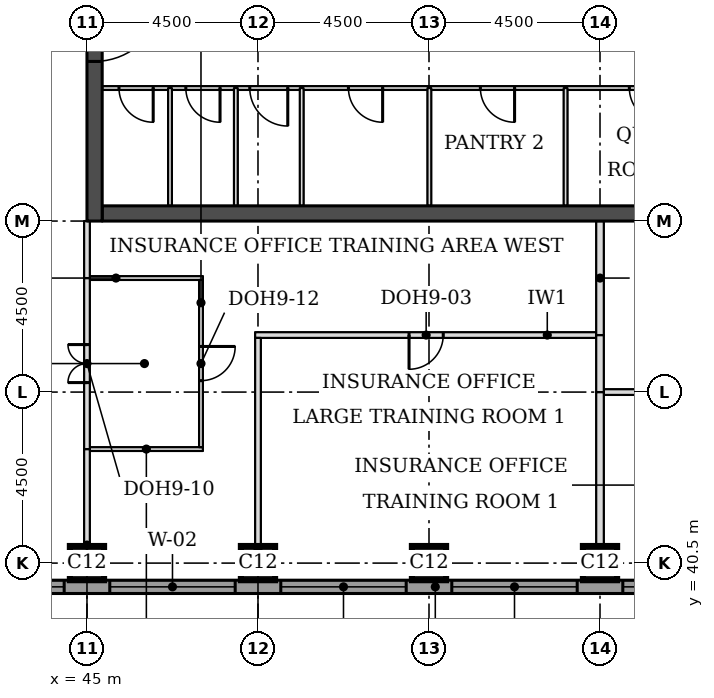
"""IFC4 building model, lengths in metres.
Left out: names, types, materials, properties, quantities, classifications, styles, units other than length and angle.
Written with IfcOpenShell. Run it as: python <this file> out.ifc"""

import sys

from ifc_helpers import new_model, si_unit, direction, frame, frame_2d, origin, origin_2d, place, context, subcontext, project, spatial, rectangle, extrude, element, fill, save


model = new_model("IFC4")
c1 = context("Model", 3, precision=1e-05, world=origin(), true_north=direction((0.0, 1.0)))
c2 = subcontext(c1, "Body", "Model", "MODEL_VIEW")
j1 = project(units=[si_unit("LENGTHUNIT", "METRE"), si_unit("PLANEANGLEUNIT", "RADIAN")], contexts=[c1])
p1 = place(None, origin())
s1 = spatial("IfcSite", under=j1, at=p1, CompositionType="ELEMENT")
p2 = place(p1, origin())
s2 = spatial("IfcBuilding", under=s1, at=p2, CompositionType="ELEMENT")
p3 = place(p2, frame((0.0, 0.0, 211.9)))
s3 = spatial("IfcBuildingStorey", under=s2, at=p3, CompositionType="ELEMENT", Elevation=211.9)
for number, where, z_axis, x_axis in (
    (1, (45.0, 40.5, 0.0), (0.0, 0.0, 1.0), (1.0, 0.0, 0.0)),
    (2, (49.5, 40.5, 0.0), (0.0, 0.0, 1.0), (1.0, 0.0, 0.0)),
    (3, (54.0, 40.5, 0.0), (0.0, 0.0, 1.0), (1.0, 0.0, 0.0)),
    (4, (58.5, 40.5, 0.0), (0.0, 0.0, 1.0), (1.0, 0.0, 0.0)),
):
    element("IfcColumn", number, at=place(p3, frame(where, z_axis=z_axis, x_axis=x_axis)), inside=s3, PredefinedType="COLUMN", context=c2, shape_type="SweptSolid", body=[
        extrude(rectangle(XDim=0.9, YDim=0.9, at=origin_2d()), origin(), (0.0, 0.0, 1.0), 3.7),
    ])
p4 = place(p3, frame((45.4, 49.7, 0.0), z_axis=(0.0, 0.0, 1.0), x_axis=(1.0, 0.0, 0.0)))
e5 = element("IfcWall", 5, at=p4, inside=s3, PredefinedType="SHEAR", context=c2, shape_type="SweptSolid", body=[
    extrude(rectangle(XDim=21.7, YDim=0.4, at=frame_2d((10.85, 0.0))), origin(), (0.0, 0.0, 1.0), 3.7),
])
p5 = place(p3, frame((45.2, 49.5, 0.0), z_axis=(0.0, 0.0, 1.0), x_axis=(0.0, 1.0, 0.0)))
e6 = element("IfcWall", 6, at=p5, inside=s3, PredefinedType="SHEAR", context=c2, shape_type="SweptSolid", body=[
    extrude(rectangle(XDim=22.5, YDim=0.4, at=frame_2d((11.25, 0.0))), origin(), (0.0, 0.0, 1.0), 3.7),
])
p6 = place(p5, frame((4.2, 0.0, 0.0)))
e7 = element("IfcOpeningElement", 7, at=p6, cuts=e6, PredefinedType="OPENING", context=c2, shape_type="SweptSolid", body=[
    extrude(rectangle(XDim=1.8, YDim=2.1, at=frame_2d((0.9, 1.05))), frame((0.0, 0.21, 0.0), z_axis=(0.0, -1.0, 0.0), x_axis=(1.0, 0.0, 0.0)), (0.0, 0.0, 1.0), 0.42),
])
p7 = place(p5, frame((6.9, 0.0, 0.0)))
e8 = element("IfcOpeningElement", 8, at=p7, cuts=e6, PredefinedType="OPENING", context=c2, shape_type="SweptSolid", body=[
    extrude(rectangle(XDim=1.1, YDim=2.1, at=frame_2d((0.55, 1.05))), frame((0.0, 0.21, 0.0), z_axis=(0.0, -1.0, 0.0), x_axis=(1.0, 0.0, 0.0)), (0.0, 0.0, 1.0), 0.42),
])
p8 = place(p5, frame((13.6, 0.0, 0.0)))
e9 = element("IfcOpeningElement", 9, at=p8, cuts=e6, PredefinedType="OPENING", context=c2, shape_type="SweptSolid", body=[
    extrude(rectangle(XDim=1.1, YDim=2.1, at=frame_2d((0.55, 1.05))), frame((0.0, 0.21, 0.0), z_axis=(0.0, -1.0, 0.0), x_axis=(1.0, 0.0, 0.0)), (0.0, 0.0, 1.0), 0.42),
])
p9 = place(p5, frame((16.5, 0.0, 0.0)))
e10 = element("IfcOpeningElement", 10, at=p9, cuts=e6, PredefinedType="OPENING", context=c2, shape_type="SweptSolid", body=[
    extrude(rectangle(XDim=1.8, YDim=2.1, at=frame_2d((0.9, 1.05))), frame((0.0, 0.21, 0.0), z_axis=(0.0, -1.0, 0.0), x_axis=(1.0, 0.0, 0.0)), (0.0, 0.0, 1.0), 0.42),
])
p10 = place(p3, frame((36.0, 39.875, 0.0), z_axis=(0.0, 0.0, 1.0), x_axis=(1.0, 0.0, 0.0)))
e11 = element("IfcWall", 11, at=p10, inside=s3, PredefinedType="STANDARD", context=c2, shape_type="SweptSolid", body=[
    extrude(rectangle(XDim=36.331, YDim=0.35, at=frame_2d((18.166, 0.0))), origin(), (0.0, 0.0, 1.0), 3.525),
])
p11 = place(p10, frame((5.1, 0.0, 0.9)))
e12 = element("IfcOpeningElement", 12, at=p11, cuts=e11, PredefinedType="OPENING", context=c2, shape_type="SweptSolid", body=[
    extrude(rectangle(XDim=3.3, YDim=1.9, at=frame_2d((1.65, 0.95))), frame((0.0, 0.185, 0.0), z_axis=(0.0, -1.0, 0.0), x_axis=(1.0, 0.0, 0.0)), (0.0, 0.0, 1.0), 0.37),
])
p12 = place(p10, frame((9.6, 0.0, 0.9)))
e13 = element("IfcOpeningElement", 13, at=p12, cuts=e11, PredefinedType="OPENING", context=c2, shape_type="SweptSolid", body=[
    extrude(rectangle(XDim=3.3, YDim=1.9, at=frame_2d((1.65, 0.95))), frame((0.0, 0.185, 0.0), z_axis=(0.0, -1.0, 0.0), x_axis=(1.0, 0.0, 0.0)), (0.0, 0.0, 1.0), 0.37),
])
p13 = place(p10, frame((14.1, 0.0, 0.9)))
e14 = element("IfcOpeningElement", 14, at=p13, cuts=e11, PredefinedType="OPENING", context=c2, shape_type="SweptSolid", body=[
    extrude(rectangle(XDim=3.3, YDim=1.9, at=frame_2d((1.65, 0.95))), frame((0.0, 0.185, 0.0), z_axis=(0.0, -1.0, 0.0), x_axis=(1.0, 0.0, 0.0)), (0.0, 0.0, 1.0), 0.37),
])
p14 = place(p10, frame((18.6, 0.0, 0.9)))
e15 = element("IfcOpeningElement", 15, at=p14, cuts=e11, PredefinedType="OPENING", context=c2, shape_type="SweptSolid", body=[
    extrude(rectangle(XDim=3.3, YDim=1.9, at=frame_2d((1.65, 0.95))), frame((0.0, 0.185, 0.0), z_axis=(0.0, -1.0, 0.0), x_axis=(1.0, 0.0, 0.0)), (0.0, 0.0, 1.0), 0.37),
])
p15 = place(p10, frame((23.1, 0.0, 0.9)))
e16 = element("IfcOpeningElement", 16, at=p15, cuts=e11, PredefinedType="OPENING", context=c2, shape_type="SweptSolid", body=[
    extrude(rectangle(XDim=3.3, YDim=1.9, at=frame_2d((1.65, 0.95))), frame((0.0, 0.185, 0.0), z_axis=(0.0, -1.0, 0.0), x_axis=(1.0, 0.0, 0.0)), (0.0, 0.0, 1.0), 0.37),
])
p16 = place(p10, frame((27.6, 0.0, 0.9)))
e17 = element("IfcOpeningElement", 17, at=p16, cuts=e11, PredefinedType="OPENING", context=c2, shape_type="SweptSolid", body=[
    extrude(rectangle(XDim=3.3, YDim=1.9, at=frame_2d((1.65, 0.95))), frame((0.0, 0.185, 0.0), z_axis=(0.0, -1.0, 0.0), x_axis=(1.0, 0.0, 0.0)), (0.0, 0.0, 1.0), 0.37),
])
p17 = place(p3, frame((45.075, 43.5, 0.0), z_axis=(0.0, 0.0, 1.0), x_axis=(1.0, 0.0, 0.0)))
e18 = element("IfcWall", 18, at=p17, inside=s3, PredefinedType="PARTITIONING", context=c2, shape_type="SweptSolid", body=[
    extrude(rectangle(XDim=2.975, YDim=0.1, at=frame_2d((1.488, 0.0))), origin(), (0.0, 0.0, 1.0), 3.55),
])
p18 = place(p3, frame((58.6, 45.0, 0.0), z_axis=(0.0, 0.0, 1.0), x_axis=(1.0, 0.0, 0.0)))
e19 = element("IfcWall", 19, at=p18, inside=s3, PredefinedType="PARTITIONING", context=c2, shape_type="SweptSolid", body=[
    extrude(rectangle(XDim=4.475, YDim=0.15, at=frame_2d((2.237, 0.0))), origin(), (0.0, 0.0, 1.0), 3.55),
])
p19 = place(p18, frame((1.8, 0.0, 0.0)))
e20 = element("IfcOpeningElement", 20, at=p19, cuts=e19, PredefinedType="OPENING", context=c2, shape_type="SweptSolid", body=[
    extrude(rectangle(XDim=0.9, YDim=2.1, at=frame_2d((0.45, 1.05))), frame((0.0, 0.085, 0.0), z_axis=(0.0, -1.0, 0.0), x_axis=(1.0, 0.0, 0.0)), (0.0, 0.0, 1.0), 0.17),
])
p20 = place(p3, frame((49.425, 46.5, 0.0), z_axis=(0.0, 0.0, 1.0), x_axis=(1.0, 0.0, 0.0)))
e21 = element("IfcWall", 21, at=p20, inside=s3, PredefinedType="PARTITIONING", context=c2, shape_type="SweptSolid", body=[
    extrude(rectangle(XDim=8.975, YDim=0.15, at=frame_2d((4.487, 0.0))), origin(), (0.0, 0.0, 1.0), 3.55),
])
p21 = place(p20, frame((4.05, 0.0, 0.0)))
e22 = element("IfcOpeningElement", 22, at=p21, cuts=e21, PredefinedType="OPENING", context=c2, shape_type="SweptSolid", body=[
    extrude(rectangle(XDim=0.9, YDim=2.1, at=frame_2d((0.45, 1.05))), frame((0.0, 0.085, 0.0), z_axis=(0.0, -1.0, 0.0), x_axis=(1.0, 0.0, 0.0)), (0.0, 0.0, 1.0), 0.17),
])
p22 = place(p3, frame((45.075, 48.0, 0.0), z_axis=(0.0, 0.0, 1.0), x_axis=(1.0, 0.0, 0.0)))
e23 = element("IfcWall", 23, at=p22, inside=s3, PredefinedType="PARTITIONING", context=c2, shape_type="SweptSolid", body=[
    extrude(rectangle(XDim=2.975, YDim=0.1, at=frame_2d((1.488, 0.0))), origin(), (0.0, 0.0, 1.0), 3.55),
])
p23 = place(p3, frame((45.0, 40.05, 0.0), z_axis=(0.0, 0.0, 1.0), x_axis=(0.0, 1.0, 0.0)))
e24 = element("IfcWall", 24, at=p23, inside=s3, PredefinedType="PARTITIONING", context=c2, shape_type="SweptSolid", body=[
    extrude(rectangle(XDim=3.45, YDim=0.15, at=frame_2d((1.725, 0.0))), origin(), (0.0, 0.0, 1.0), 3.022),
])
p24 = place(p3, frame((49.5, 40.05, 0.0), z_axis=(0.0, 0.0, 1.0), x_axis=(0.0, 1.0, 0.0)))
e25 = element("IfcWall", 25, at=p24, inside=s3, PredefinedType="PARTITIONING", context=c2, shape_type="SweptSolid", body=[
    extrude(rectangle(XDim=6.375, YDim=0.15, at=frame_2d((3.188, 0.0))), origin(), (0.0, 0.0, 1.0), 3.55),
])
p25 = place(p3, frame((58.5, 40.05, 0.0), z_axis=(0.0, 0.0, 1.0), x_axis=(0.0, 1.0, 0.0)))
e26 = element("IfcWall", 26, at=p25, inside=s3, PredefinedType="PARTITIONING", context=c2, shape_type="SweptSolid", body=[
    extrude(rectangle(XDim=4.95, YDim=0.2, at=frame_2d((2.475, 0.0))), origin(), (0.0, 0.0, 1.0), 3.55),
])
p26 = place(p3, frame((45.0, 43.5, 0.0), z_axis=(0.0, 0.0, 1.0), x_axis=(0.0, 1.0, 0.0)))
e27 = element("IfcWall", 27, at=p26, inside=s3, PredefinedType="PARTITIONING", context=c2, shape_type="SweptSolid", body=[
    extrude(rectangle(XDim=4.5, YDim=0.15, at=frame_2d((2.25, 0.0))), origin(), (0.0, 0.0, 1.0), 3.022),
])
p27 = place(p26, frame((1.75, 0.0, 0.0)))
e28 = element("IfcOpeningElement", 28, at=p27, cuts=e27, PredefinedType="OPENING", context=c2, shape_type="SweptSolid", body=[
    extrude(rectangle(XDim=1.0, YDim=2.1, at=frame_2d((0.5, 1.05))), frame((0.0, 0.085, 0.0), z_axis=(0.0, -1.0, 0.0), x_axis=(1.0, 0.0, 0.0)), (0.0, 0.0, 1.0), 0.17),
])
p28 = place(p3, frame((48.0, 43.55, 0.0), z_axis=(0.0, 0.0, 1.0), x_axis=(0.0, 1.0, 0.0)))
e29 = element("IfcWall", 29, at=p28, inside=s3, PredefinedType="PARTITIONING", context=c2, shape_type="SweptSolid", body=[
    extrude(rectangle(XDim=4.4, YDim=0.1, at=frame_2d((2.2, 0.0))), origin(), (0.0, 0.0, 1.0), 3.55),
])
p29 = place(p28, frame((1.75, 0.0, 0.0)))
e30 = element("IfcOpeningElement", 30, at=p29, cuts=e29, PredefinedType="OPENING", context=c2, shape_type="SweptSolid", body=[
    extrude(rectangle(XDim=0.9, YDim=2.1, at=frame_2d((0.45, 1.05))), frame((0.0, 0.06, 0.0), z_axis=(0.0, -1.0, 0.0), x_axis=(1.0, 0.0, 0.0)), (0.0, 0.0, 1.0), 0.12),
])
p30 = place(p3, frame((58.5, 45.0, 0.0), z_axis=(0.0, 0.0, 1.0), x_axis=(0.0, 1.0, 0.0)))
e31 = element("IfcWall", 31, at=p30, inside=s3, PredefinedType="PARTITIONING", context=c2, shape_type="SweptSolid", body=[
    extrude(rectangle(XDim=1.5, YDim=0.2, at=frame_2d((0.75, 0.0))), origin(), (0.0, 0.0, 1.0), 3.55),
])
p31 = place(p3, frame((58.5, 46.5, 0.0), z_axis=(0.0, 0.0, 1.0), x_axis=(0.0, 1.0, 0.0)))
e32 = element("IfcWall", 32, at=p31, inside=s3, PredefinedType="PARTITIONING", context=c2, shape_type="SweptSolid", body=[
    extrude(rectangle(XDim=3.0, YDim=0.2, at=frame_2d((1.5, 0.0))), origin(), (0.0, 0.0, 1.0), 3.55),
])
p32 = place(p3, frame((45.0, 48.0, 0.0), z_axis=(0.0, 0.0, 1.0), x_axis=(0.0, 1.0, 0.0)))
e33 = element("IfcWall", 33, at=p32, inside=s3, PredefinedType="PARTITIONING", context=c2, shape_type="SweptSolid", body=[
    extrude(rectangle(XDim=1.5, YDim=0.15, at=frame_2d((0.75, 0.0))), origin(), (0.0, 0.0, 1.0), 3.022),
])
p33 = place(p3, frame((45.4, 53.0, 0.0), z_axis=(0.0, 0.0, 1.0), x_axis=(1.0, 0.0, 0.0)))
e34 = element("IfcWall", 34, at=p33, inside=s3, PredefinedType="PARTITIONING", context=c2, shape_type="SweptSolid", body=[
    extrude(rectangle(XDim=21.7, YDim=0.1, at=frame_2d((10.85, 0.0))), origin(), (0.0, 0.0, 1.0), 3.55),
])
p34 = place(p33, frame((20.305, 0.0, 0.0)))
e35 = element("IfcOpeningElement", 35, at=p34, cuts=e34, PredefinedType="OPENING", context=c2, shape_type="SweptSolid", body=[
    extrude(rectangle(XDim=0.9, YDim=2.1, at=frame_2d((0.45, 1.05))), frame((0.0, 0.06, 0.0), z_axis=(0.0, -1.0, 0.0), x_axis=(1.0, 0.0, 0.0)), (0.0, 0.0, 1.0), 0.12),
])
p35 = place(p33, frame((17.68, 0.0, 0.0)))
e36 = element("IfcOpeningElement", 36, at=p35, cuts=e34, PredefinedType="OPENING", context=c2, shape_type="SweptSolid", body=[
    extrude(rectangle(XDim=0.9, YDim=2.1, at=frame_2d((0.45, 1.05))), frame((0.0, 0.06, 0.0), z_axis=(0.0, -1.0, 0.0), x_axis=(1.0, 0.0, 0.0)), (0.0, 0.0, 1.0), 0.12),
])
p36 = place(p33, frame((0.442, 0.0, 0.0)))
e37 = element("IfcOpeningElement", 37, at=p36, cuts=e34, PredefinedType="OPENING", context=c2, shape_type="SweptSolid", body=[
    extrude(rectangle(XDim=0.9, YDim=2.1, at=frame_2d((0.45, 1.05))), frame((0.0, 0.06, 0.0), z_axis=(0.0, -1.0, 0.0), x_axis=(1.0, 0.0, 0.0)), (0.0, 0.0, 1.0), 0.12),
])
p37 = place(p33, frame((2.201, 0.0, 0.0)))
e38 = element("IfcOpeningElement", 38, at=p37, cuts=e34, PredefinedType="OPENING", context=c2, shape_type="SweptSolid", body=[
    extrude(rectangle(XDim=0.9, YDim=2.1, at=frame_2d((0.45, 1.05))), frame((0.0, 0.06, 0.0), z_axis=(0.0, -1.0, 0.0), x_axis=(1.0, 0.0, 0.0)), (0.0, 0.0, 1.0), 0.12),
])
p38 = place(p33, frame((3.884, 0.0, 0.0)))
e39 = element("IfcOpeningElement", 39, at=p38, cuts=e34, PredefinedType="OPENING", context=c2, shape_type="SweptSolid", body=[
    extrude(rectangle(XDim=1.0, YDim=2.1, at=frame_2d((0.5, 1.05))), frame((0.0, 0.06, 0.0), z_axis=(0.0, -1.0, 0.0), x_axis=(1.0, 0.0, 0.0)), (0.0, 0.0, 1.0), 0.12),
])
p39 = place(p33, frame((6.48, 0.0, 0.0)))
e40 = element("IfcOpeningElement", 40, at=p39, cuts=e34, PredefinedType="OPENING", context=c2, shape_type="SweptSolid", body=[
    extrude(rectangle(XDim=0.9, YDim=2.1, at=frame_2d((0.45, 1.05))), frame((0.0, 0.06, 0.0), z_axis=(0.0, -1.0, 0.0), x_axis=(1.0, 0.0, 0.0)), (0.0, 0.0, 1.0), 0.12),
])
p40 = place(p33, frame((9.952, 0.0, 0.0)))
e41 = element("IfcOpeningElement", 41, at=p40, cuts=e34, PredefinedType="OPENING", context=c2, shape_type="SweptSolid", body=[
    extrude(rectangle(XDim=0.9, YDim=2.1, at=frame_2d((0.45, 1.05))), frame((0.0, 0.06, 0.0), z_axis=(0.0, -1.0, 0.0), x_axis=(1.0, 0.0, 0.0)), (0.0, 0.0, 1.0), 0.12),
])
p41 = place(p33, frame((13.872, 0.0, 0.0)))
e42 = element("IfcOpeningElement", 42, at=p41, cuts=e34, PredefinedType="OPENING", context=c2, shape_type="SweptSolid", body=[
    extrude(rectangle(XDim=0.9, YDim=2.1, at=frame_2d((0.45, 1.05))), frame((0.0, 0.06, 0.0), z_axis=(0.0, -1.0, 0.0), x_axis=(1.0, 0.0, 0.0)), (0.0, 0.0, 1.0), 0.12),
])
for number, where, z_axis, x_axis in (
    (43, (47.185, 49.9, 0.0), (0.0, 0.0, 1.0), (0.0, 1.0, 0.0)),
    (44, (48.917, 49.9, 0.0), (0.0, 0.0, 1.0), (0.0, 1.0, 0.0)),
    (45, (50.65, 49.9, 0.0), (0.0, 0.0, 1.0), (0.0, 1.0, 0.0)),
    (46, (54.01, 49.9, 0.0), (0.0, 0.0, 1.0), (0.0, 1.0, 0.0)),
    (47, (57.594, 49.9, 0.0), (0.0, 0.0, 1.0), (0.0, 1.0, 0.0)),
):
    element("IfcWall", number, at=place(p3, frame(where, z_axis=z_axis, x_axis=x_axis)), inside=s3, PredefinedType="PARTITIONING", context=c2, shape_type="SweptSolid", body=[
        extrude(rectangle(XDim=3.1, YDim=0.1, at=frame_2d((1.55, 0.0))), origin(), (0.0, 0.0, 1.0), 3.55),
    ])
p42 = place(p11, origin())
e48 = element("IfcWindow", 48, at=p42, inside=s3, PartitioningType="SINGLE_PANEL", PredefinedType="WINDOW", context=c2, shape_type="SweptSolid", body=[
    extrude(rectangle(XDim=3.3, YDim=1.9, at=frame_2d((1.65, 0.95))), frame((0.0, 0.085, 0.0), z_axis=(0.0, -1.0, 0.0), x_axis=(1.0, 0.0, 0.0)), (0.0, 0.0, 1.0), 0.06),
])
fill(e12, e48)
p43 = place(p12, origin())
e49 = element("IfcWindow", 49, at=p43, inside=s3, PartitioningType="SINGLE_PANEL", PredefinedType="WINDOW", context=c2, shape_type="SweptSolid", body=[
    extrude(rectangle(XDim=3.3, YDim=1.9, at=frame_2d((1.65, 0.95))), frame((0.0, 0.085, 0.0), z_axis=(0.0, -1.0, 0.0), x_axis=(1.0, 0.0, 0.0)), (0.0, 0.0, 1.0), 0.06),
])
fill(e13, e49)
p44 = place(p13, origin())
e50 = element("IfcWindow", 50, at=p44, inside=s3, PartitioningType="SINGLE_PANEL", PredefinedType="WINDOW", context=c2, shape_type="SweptSolid", body=[
    extrude(rectangle(XDim=3.3, YDim=1.9, at=frame_2d((1.65, 0.95))), frame((0.0, 0.085, 0.0), z_axis=(0.0, -1.0, 0.0), x_axis=(1.0, 0.0, 0.0)), (0.0, 0.0, 1.0), 0.06),
])
fill(e14, e50)
p45 = place(p14, origin())
e51 = element("IfcWindow", 51, at=p45, inside=s3, PartitioningType="SINGLE_PANEL", PredefinedType="WINDOW", context=c2, shape_type="SweptSolid", body=[
    extrude(rectangle(XDim=3.3, YDim=1.9, at=frame_2d((1.65, 0.95))), frame((0.0, 0.085, 0.0), z_axis=(0.0, -1.0, 0.0), x_axis=(1.0, 0.0, 0.0)), (0.0, 0.0, 1.0), 0.06),
])
fill(e15, e51)
p46 = place(p15, origin())
e52 = element("IfcWindow", 52, at=p46, inside=s3, PartitioningType="SINGLE_PANEL", PredefinedType="WINDOW", context=c2, shape_type="SweptSolid", body=[
    extrude(rectangle(XDim=3.3, YDim=1.9, at=frame_2d((1.65, 0.95))), frame((0.0, 0.085, 0.0), z_axis=(0.0, -1.0, 0.0), x_axis=(1.0, 0.0, 0.0)), (0.0, 0.0, 1.0), 0.06),
])
fill(e16, e52)
p47 = place(p27, origin())
e53 = element("IfcDoor", 53, at=p47, inside=s3, OperationType="DOUBLE_DOOR_SINGLE_SWING", PredefinedType="DOOR", context=c2, shape_type="SweptSolid", body=[
    extrude(rectangle(XDim=1.0, YDim=2.1, at=frame_2d((0.5, 1.05))), frame((0.0, 0.025, 0.0), z_axis=(0.0, -1.0, 0.0), x_axis=(1.0, 0.0, 0.0)), (0.0, 0.0, 1.0), 0.05),
])
fill(e28, e53)
p48 = place(p29, frame((0.9, 0.0, 0.0), z_axis=(0.0, 0.0, 1.0), x_axis=(-1.0, 0.0, 0.0)))
e54 = element("IfcDoor", 54, at=p48, inside=s3, OperationType="SINGLE_SWING_LEFT", PredefinedType="DOOR", context=c2, shape_type="SweptSolid", body=[
    extrude(rectangle(XDim=0.9, YDim=2.1, at=frame_2d((0.45, 1.05))), frame((0.0, 0.025, 0.0), z_axis=(0.0, -1.0, 0.0), x_axis=(1.0, 0.0, 0.0)), (0.0, 0.0, 1.0), 0.05),
])
fill(e30, e54)
p49 = place(p21, frame((0.9, 0.0, 0.0), z_axis=(0.0, 0.0, 1.0), x_axis=(-1.0, 0.0, 0.0)))
e55 = element("IfcDoor", 55, at=p49, inside=s3, OperationType="SINGLE_SWING_RIGHT", PredefinedType="DOOR", context=c2, shape_type="SweptSolid", body=[
    extrude(rectangle(XDim=0.9, YDim=2.1, at=frame_2d((0.45, 1.05))), frame((0.0, 0.025, 0.0), z_axis=(0.0, -1.0, 0.0), x_axis=(1.0, 0.0, 0.0)), (0.0, 0.0, 1.0), 0.05),
])
fill(e22, e55)
p50 = place(p6, frame((1.8, 0.0, 0.0), z_axis=(0.0, 0.0, 1.0), x_axis=(-1.0, 0.0, 0.0)))
e56 = element("IfcDoor", 56, at=p50, inside=s3, OperationType="SINGLE_SWING_LEFT", PredefinedType="DOOR", context=c2, shape_type="SweptSolid", body=[
    extrude(rectangle(XDim=1.8, YDim=2.1, at=frame_2d((0.9, 1.05))), frame((0.0, 0.025, 0.0), z_axis=(0.0, -1.0, 0.0), x_axis=(1.0, 0.0, 0.0)), (0.0, 0.0, 1.0), 0.05),
])
fill(e7, e56)
p51 = place(p36, frame((0.9, 0.0, 0.0), z_axis=(0.0, 0.0, 1.0), x_axis=(-1.0, 0.0, 0.0)))
e57 = element("IfcDoor", 57, at=p51, inside=s3, OperationType="SINGLE_SWING_LEFT", PredefinedType="DOOR", context=c2, shape_type="SweptSolid", body=[
    extrude(rectangle(XDim=0.9, YDim=2.1, at=frame_2d((0.45, 1.05))), frame((0.0, 0.025, 0.0), z_axis=(0.0, -1.0, 0.0), x_axis=(1.0, 0.0, 0.0)), (0.0, 0.0, 1.0), 0.05),
])
fill(e37, e57)
p52 = place(p37, frame((0.9, 0.0, 0.0), z_axis=(0.0, 0.0, 1.0), x_axis=(-1.0, 0.0, 0.0)))
e58 = element("IfcDoor", 58, at=p52, inside=s3, OperationType="SINGLE_SWING_LEFT", PredefinedType="DOOR", context=c2, shape_type="SweptSolid", body=[
    extrude(rectangle(XDim=0.9, YDim=2.1, at=frame_2d((0.45, 1.05))), frame((0.0, 0.025, 0.0), z_axis=(0.0, -1.0, 0.0), x_axis=(1.0, 0.0, 0.0)), (0.0, 0.0, 1.0), 0.05),
])
fill(e38, e58)
p53 = place(p38, frame((1.0, 0.0, 0.0), z_axis=(0.0, 0.0, 1.0), x_axis=(-1.0, 0.0, 0.0)))
e59 = element("IfcDoor", 59, at=p53, inside=s3, OperationType="SINGLE_SWING_LEFT", PredefinedType="DOOR", context=c2, shape_type="SweptSolid", body=[
    extrude(rectangle(XDim=1.0, YDim=2.1, at=frame_2d((0.5, 1.05))), frame((0.0, 0.025, 0.0), z_axis=(0.0, -1.0, 0.0), x_axis=(1.0, 0.0, 0.0)), (0.0, 0.0, 1.0), 0.05),
])
fill(e39, e59)
p54 = place(p39, frame((0.9, 0.0, 0.0), z_axis=(0.0, 0.0, 1.0), x_axis=(-1.0, 0.0, 0.0)))
e60 = element("IfcDoor", 60, at=p54, inside=s3, OperationType="SINGLE_SWING_LEFT", PredefinedType="DOOR", context=c2, shape_type="SweptSolid", body=[
    extrude(rectangle(XDim=0.9, YDim=2.1, at=frame_2d((0.45, 1.05))), frame((0.0, 0.025, 0.0), z_axis=(0.0, -1.0, 0.0), x_axis=(1.0, 0.0, 0.0)), (0.0, 0.0, 1.0), 0.05),
])
fill(e40, e60)
p55 = place(p40, frame((0.9, 0.0, 0.0), z_axis=(0.0, 0.0, 1.0), x_axis=(-1.0, 0.0, 0.0)))
e61 = element("IfcDoor", 61, at=p55, inside=s3, OperationType="SINGLE_SWING_LEFT", PredefinedType="DOOR", context=c2, shape_type="SweptSolid", body=[
    extrude(rectangle(XDim=0.9, YDim=2.1, at=frame_2d((0.45, 1.05))), frame((0.0, 0.025, 0.0), z_axis=(0.0, -1.0, 0.0), x_axis=(1.0, 0.0, 0.0)), (0.0, 0.0, 1.0), 0.05),
])
fill(e41, e61)
p56 = place(p41, frame((0.9, 0.0, 0.0), z_axis=(0.0, 0.0, 1.0), x_axis=(-1.0, 0.0, 0.0)))
e62 = element("IfcDoor", 62, at=p56, inside=s3, OperationType="SINGLE_SWING_LEFT", PredefinedType="DOOR", context=c2, shape_type="SweptSolid", body=[
    extrude(rectangle(XDim=0.9, YDim=2.1, at=frame_2d((0.45, 1.05))), frame((0.0, 0.025, 0.0), z_axis=(0.0, -1.0, 0.0), x_axis=(1.0, 0.0, 0.0)), (0.0, 0.0, 1.0), 0.05),
])
fill(e42, e62)
save(model, sys.argv[1])
